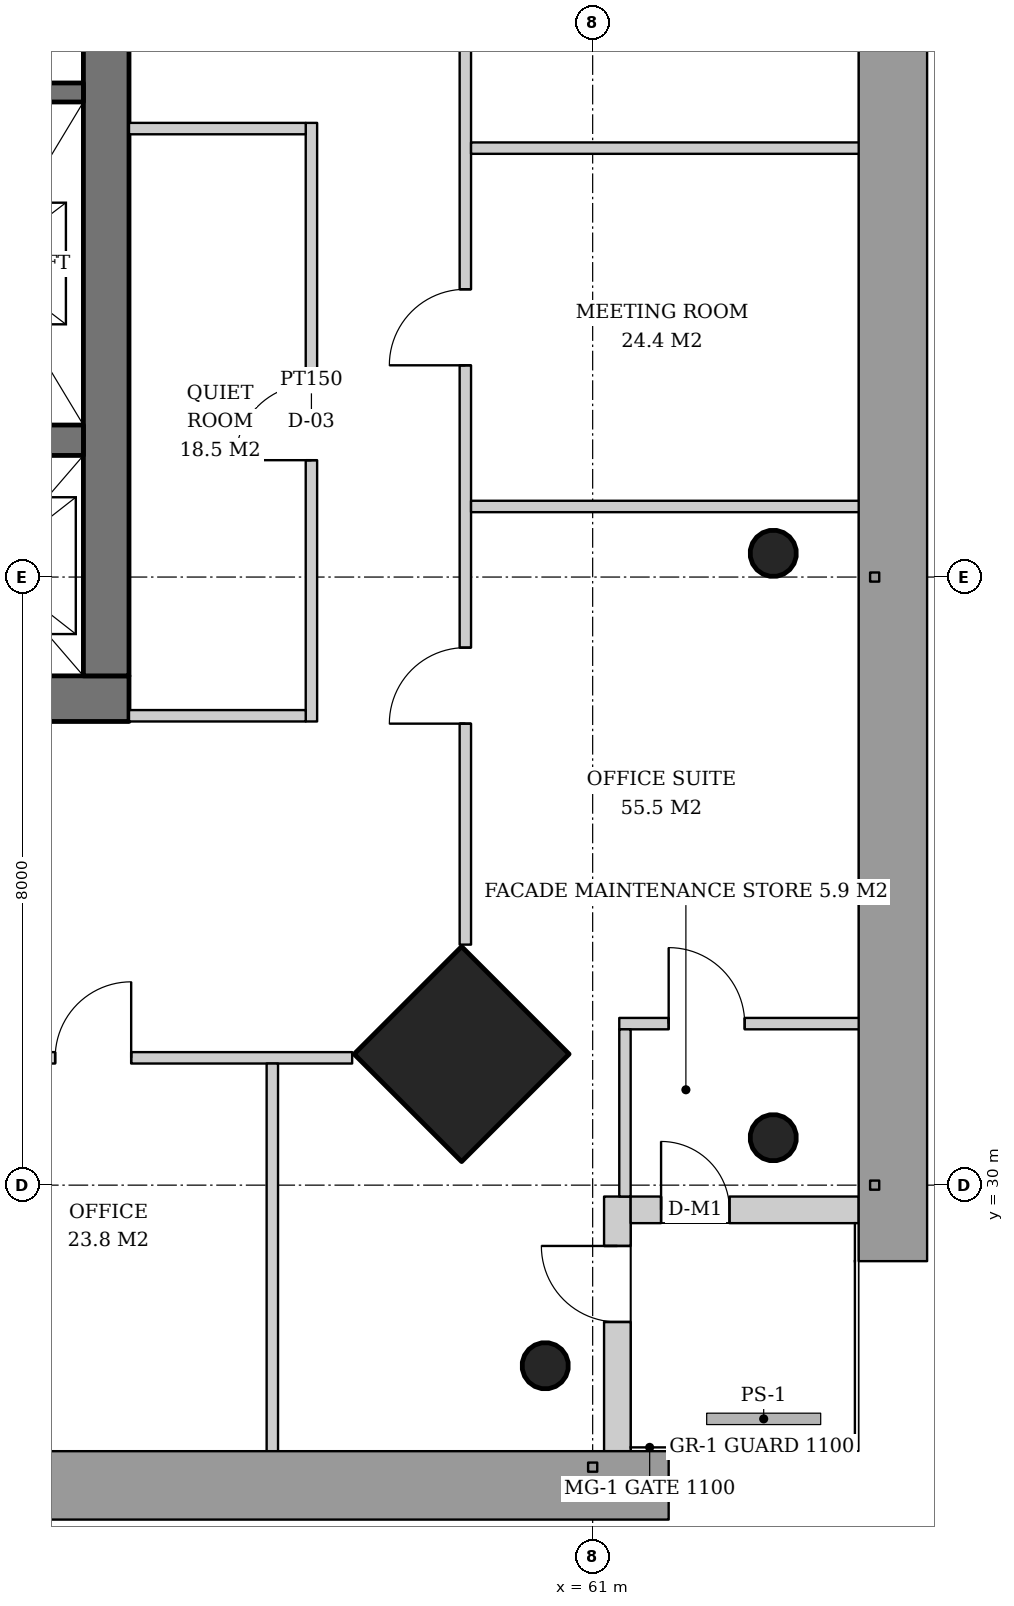
"""IFC4 building model, lengths in metres.
Left out: names, types, materials, properties, quantities, classifications, styles, units other than length and angle.
Written with IfcOpenShell. Run it as: python <this file> out.ifc"""

import sys

from ifc_helpers import new_model, si_unit, direction, frame, frame_2d, origin, origin_2d, place, context, subcontext, project, spatial, rectangle, hollow_circle, extrude, element, fill, save


model = new_model("IFC4")
c1 = context("Model", 3, precision=1e-05, world=origin(), true_north=direction((0.0, 1.0)))
c2 = subcontext(c1, "Body", "Model", "MODEL_VIEW")
j1 = project(units=[si_unit("LENGTHUNIT", "METRE"), si_unit("PLANEANGLEUNIT", "RADIAN")], contexts=[c1])
p1 = place(None, origin())
s1 = spatial("IfcSite", under=j1, at=p1, CompositionType="ELEMENT")
p2 = place(p1, origin())
s2 = spatial("IfcBuilding", under=s1, at=p2, CompositionType="ELEMENT")
p3 = place(p2, frame((0.0, 0.0, 195.8)))
s3 = spatial("IfcBuildingStorey", under=s2, at=p3, CompositionType="ELEMENT", Elevation=195.8)
p4 = place(p3, frame((63.414, 30.586, 0.0), z_axis=(-0.031898107953, 0.031898107953, 0.998981992539), x_axis=(-0.707106781187, -0.707106781187, 0.0)))
e1 = element("IfcColumn", 1, at=p4, inside=s3, PredefinedType="COLUMN", context=c2, shape_type="SweptSolid", body=[
    extrude(hollow_circle(Radius=0.305, WallThickness=0.025, at=origin_2d()), origin(), (0.0, 0.0, 1.0), 3.804),
])
p5 = place(p3, frame((63.414, 38.293, 0.0), z_axis=(-0.031910302246, 0.015923048203, 0.999363892257), x_axis=(-0.446493300058, -0.894786976326, 0.0)))
e2 = element("IfcColumn", 2, at=p5, inside=s3, PredefinedType="COLUMN", context=c2, shape_type="SweptSolid", body=[
    extrude(hollow_circle(Radius=0.305, WallThickness=0.025, at=origin_2d()), origin(), (0.0, 0.0, 1.0), 3.802),
])
p6 = place(p3, frame((59.314, 31.686, 0.0), z_axis=(-0.031898107953, 0.031898107953, 0.998981992539), x_axis=(-0.707106781187, -0.707106781187, 0.0)))
e3 = element("IfcColumn", 3, at=p6, inside=s3, PredefinedType="COLUMN", context=c2, shape_type="SweptSolid", body=[
    extrude(rectangle(XDim=2.0, YDim=2.0, at=origin_2d()), origin(), (0.0, 0.0, 1.0), 3.804),
])
p7 = place(p3, frame((60.414, 27.586, 0.0), z_axis=(-0.031898107953, 0.031898107953, 0.998981992539), x_axis=(-0.707106781187, -0.707106781187, 0.0)))
e4 = element("IfcColumn", 4, at=p7, inside=s3, PredefinedType="COLUMN", context=c2, shape_type="SweptSolid", body=[
    extrude(hollow_circle(Radius=0.305, WallThickness=0.025, at=origin_2d()), origin(), (0.0, 0.0, 1.0), 3.804),
])
p8 = place(p3, frame((35.1, 36.4, 0.0), z_axis=(0.0, 0.0, 1.0), x_axis=(1.0, 0.0, 0.0)))
e5 = element("IfcWall", 5, at=p8, inside=s3, PredefinedType="SHEAR", context=c2, shape_type="SweptSolid", body=[
    extrude(rectangle(XDim=19.8, YDim=0.6, at=frame_2d((9.9, 0.0))), origin(), (0.0, 0.0, 1.0), 3.8),
])
p9 = place(p8, frame((3.9, 0.0, 0.0)))
e6 = element("IfcOpeningElement", 6, at=p9, cuts=e5, PredefinedType="OPENING", context=c2, shape_type="SweptSolid", body=[
    extrude(rectangle(XDim=1.0, YDim=2.1, at=frame_2d((0.5, 1.05))), frame((0.0, 0.31, 0.0), z_axis=(0.0, -1.0, 0.0), x_axis=(1.0, 0.0, 0.0)), (0.0, 0.0, 1.0), 0.62),
])
p10 = place(p8, frame((15.35, 0.0, 0.0)))
e7 = element("IfcOpeningElement", 7, at=p10, cuts=e5, PredefinedType="OPENING", context=c2, shape_type="SweptSolid", body=[
    extrude(rectangle(XDim=1.0, YDim=2.1, at=frame_2d((0.5, 1.05))), frame((0.0, 0.31, 0.0), z_axis=(0.0, -1.0, 0.0), x_axis=(1.0, 0.0, 0.0)), (0.0, 0.0, 1.0), 0.62),
])
p11 = place(p3, frame((54.6, 36.7, 0.0), z_axis=(0.0, 0.0, 1.0), x_axis=(0.0, 1.0, 0.0)))
e8 = element("IfcWall", 8, at=p11, inside=s3, PredefinedType="SHEAR", context=c2, shape_type="SweptSolid", body=[
    extrude(rectangle(XDim=18.6, YDim=0.6, at=frame_2d((9.3, 0.0))), origin(), (0.0, 0.0, 1.0), 3.8),
])
p12 = place(p11, frame((8.4, 0.0, 0.0)))
e9 = element("IfcOpeningElement", 9, at=p12, cuts=e8, PredefinedType="OPENING", context=c2, shape_type="SweptSolid", body=[
    extrude(rectangle(XDim=1.8, YDim=2.4, at=frame_2d((0.9, 1.2))), frame((0.0, 0.31, 0.0), z_axis=(0.0, -1.0, 0.0), x_axis=(1.0, 0.0, 0.0)), (0.0, 0.0, 1.0), 0.62),
])
p13 = place(p3, frame((35.7, 39.8, 0.0), z_axis=(0.0, 0.0, 1.0), x_axis=(1.0, 0.0, 0.0)))
e10 = element("IfcWall", 10, at=p13, inside=s3, PredefinedType="SHEAR", context=c2, shape_type="SweptSolid", body=[
    extrude(rectangle(XDim=18.6, YDim=0.4, at=frame_2d((9.3, 0.0))), origin(), (0.0, 0.0, 1.0), 3.8),
])
p14 = place(p3, frame((61.325, 26.5, 0.0), z_axis=(0.0, 0.0, 1.0), x_axis=(0.0, 1.0, 0.0)))
e11 = element("IfcWall", 11, at=p14, inside=s3, PredefinedType="SOLIDWALL", context=c2, shape_type="SweptSolid", body=[
    extrude(rectangle(XDim=3.35, YDim=0.35, at=frame_2d((1.675, 0.0))), origin(), (0.0, 0.0, 1.0), 3.62),
])
p15 = place(p14, frame((1.7, 0.0, 0.0)))
e12 = element("IfcOpeningElement", 12, at=p15, cuts=e11, PredefinedType="OPENING", context=c2, shape_type="SweptSolid", body=[
    extrude(rectangle(XDim=1.0, YDim=2.4, at=frame_2d((0.5, 1.2))), frame((0.0, 0.185, 0.0), z_axis=(0.0, -1.0, 0.0), x_axis=(1.0, 0.0, 0.0)), (0.0, 0.0, 1.0), 0.37),
])
p16 = place(p3, frame((61.5, 29.675, 0.0), z_axis=(0.0, 0.0, 1.0), x_axis=(1.0, 0.0, 0.0)))
e13 = element("IfcWall", 13, at=p16, inside=s3, PredefinedType="SOLIDWALL", context=c2, shape_type="SweptSolid", body=[
    extrude(rectangle(XDim=3.0, YDim=0.35, at=frame_2d((1.5, 0.0))), origin(), (0.0, 0.0, 1.0), 3.62),
])
p17 = place(p16, frame((0.4, 0.0, 0.0)))
e14 = element("IfcOpeningElement", 14, at=p17, cuts=e13, PredefinedType="OPENING", context=c2, shape_type="SweptSolid", body=[
    extrude(rectangle(XDim=0.9, YDim=2.1, at=frame_2d((0.45, 1.05))), frame((0.0, 0.185, 0.0), z_axis=(0.0, -1.0, 0.0), x_axis=(1.0, 0.0, 0.0)), (0.0, 0.0, 1.0), 0.37),
])
p18 = place(p3, frame((48.93, 44.375, 0.0), z_axis=(0.0, 0.0, 1.0), x_axis=(1.0, 0.0, 0.0)))
e15 = element("IfcWall", 15, at=p18, inside=s3, PredefinedType="SHEAR", context=c2, shape_type="SweptSolid", body=[
    extrude(rectangle(XDim=5.37, YDim=0.25, at=frame_2d((2.685, 0.0))), origin(), (0.0, 0.0, 1.0), 3.8),
])
p19 = place(p3, frame((57.3, 36.1, 0.0), z_axis=(0.0, 0.0, 1.0), x_axis=(0.0, 1.0, 0.0)))
e16 = element("IfcWall", 16, at=p19, inside=s3, PredefinedType="PARTITIONING", context=c2, shape_type="SweptSolid", body=[
    extrude(rectangle(XDim=7.875, YDim=0.15, at=frame_2d((3.938, 0.0))), origin(), (0.0, 0.0, 1.0), 2.867),
])
p20 = place(p19, frame((3.438, 0.0, 0.0)))
e17 = element("IfcOpeningElement", 17, at=p20, cuts=e16, PredefinedType="OPENING", context=c2, shape_type="SweptSolid", body=[
    extrude(rectangle(XDim=1.0, YDim=2.1, at=frame_2d((0.5, 1.05))), frame((0.0, 0.085, 0.0), z_axis=(0.0, -1.0, 0.0), x_axis=(1.0, 0.0, 0.0)), (0.0, 0.0, 1.0), 0.17),
])
p21 = place(p3, frame((54.9, 36.175, 0.0), z_axis=(0.0, 0.0, 1.0), x_axis=(1.0, 0.0, 0.0)))
e18 = element("IfcWall", 18, at=p21, inside=s3, PredefinedType="PARTITIONING", context=c2, shape_type="SweptSolid", body=[
    extrude(rectangle(XDim=2.325, YDim=0.15, at=frame_2d((1.163, 0.0))), origin(), (0.0, 0.0, 1.0), 2.867),
])
p22 = place(p3, frame((54.9, 43.9, 0.0), z_axis=(0.0, 0.0, 1.0), x_axis=(1.0, 0.0, 0.0)))
e19 = element("IfcWall", 19, at=p22, inside=s3, PredefinedType="PARTITIONING", context=c2, shape_type="SweptSolid", body=[
    extrude(rectangle(XDim=2.325, YDim=0.15, at=frame_2d((1.163, 0.0))), origin(), (0.0, 0.0, 1.0), 3.62),
])
p23 = place(p3, frame((59.325, 33.164, 0.0), z_axis=(0.0, 0.0, 1.0), x_axis=(0.0, 1.0, 0.0)))
e20 = element("IfcWall", 20, at=p23, inside=s3, PredefinedType="PARTITIONING", context=c2, shape_type="SweptSolid", body=[
    extrude(rectangle(XDim=25.671, YDim=0.15, at=frame_2d((12.836, 0.0))), origin(), (0.0, 0.0, 1.0), 2.867),
])
p24 = place(p23, frame((2.907, 0.0, 0.0)))
e21 = element("IfcOpeningElement", 21, at=p24, cuts=e20, PredefinedType="OPENING", context=c2, shape_type="SweptSolid", body=[
    extrude(rectangle(XDim=1.0, YDim=2.1, at=frame_2d((0.5, 1.05))), frame((0.0, 0.085, 0.0), z_axis=(0.0, -1.0, 0.0), x_axis=(1.0, 0.0, 0.0)), (0.0, 0.0, 1.0), 0.17),
])
p25 = place(p23, frame((7.622, 0.0, 0.0)))
e22 = element("IfcOpeningElement", 22, at=p25, cuts=e20, PredefinedType="OPENING", context=c2, shape_type="SweptSolid", body=[
    extrude(rectangle(XDim=1.0, YDim=2.1, at=frame_2d((0.5, 1.05))), frame((0.0, 0.085, 0.0), z_axis=(0.0, -1.0, 0.0), x_axis=(1.0, 0.0, 0.0)), (0.0, 0.0, 1.0), 0.17),
])
p26 = place(p23, frame((12.336, 0.0, 0.0)))
e23 = element("IfcOpeningElement", 23, at=p26, cuts=e20, PredefinedType="OPENING", context=c2, shape_type="SweptSolid", body=[
    extrude(rectangle(XDim=1.0, YDim=2.1, at=frame_2d((0.5, 1.05))), frame((0.0, 0.085, 0.0), z_axis=(0.0, -1.0, 0.0), x_axis=(1.0, 0.0, 0.0)), (0.0, 0.0, 1.0), 0.17),
])
p27 = place(p23, frame((17.05, 0.0, 0.0)))
e24 = element("IfcOpeningElement", 24, at=p27, cuts=e20, PredefinedType="OPENING", context=c2, shape_type="SweptSolid", body=[
    extrude(rectangle(XDim=1.0, YDim=2.1, at=frame_2d((0.5, 1.05))), frame((0.0, 0.085, 0.0), z_axis=(0.0, -1.0, 0.0), x_axis=(1.0, 0.0, 0.0)), (0.0, 0.0, 1.0), 0.17),
])
for number, where, z_axis, x_axis in (
    (25, (59.4, 38.928, 0.0), (0.0, 0.0, 1.0), (1.0, 0.0, 0.0)),
    (26, (59.4, 43.643, 0.0), (0.0, 0.0, 1.0), (1.0, 0.0, 0.0)),
):
    element("IfcWall", number, at=place(p3, frame(where, z_axis=z_axis, x_axis=x_axis)), inside=s3, PredefinedType="PARTITIONING", context=c2, shape_type="SweptSolid", body=[
        extrude(rectangle(XDim=5.14, YDim=0.15, at=frame_2d((2.57, 0.0))), origin(), (0.0, 0.0, 1.0), 3.12),
    ])
p28 = place(p3, frame((32.164, 31.675, 0.0), z_axis=(0.0, 0.0, 1.0), x_axis=(1.0, 0.0, 0.0)))
e27 = element("IfcWall", 27, at=p28, inside=s3, PredefinedType="PARTITIONING", context=c2, shape_type="SweptSolid", body=[
    extrude(rectangle(XDim=25.671, YDim=0.15, at=frame_2d((12.836, 0.0))), origin(), (0.0, 0.0, 1.0), 2.867),
])
p29 = place(p28, frame((2.907, 0.0, 0.0)))
e28 = element("IfcOpeningElement", 28, at=p29, cuts=e27, PredefinedType="OPENING", context=c2, shape_type="SweptSolid", body=[
    extrude(rectangle(XDim=1.0, YDim=2.1, at=frame_2d((0.5, 1.05))), frame((0.0, 0.085, 0.0), z_axis=(0.0, -1.0, 0.0), x_axis=(1.0, 0.0, 0.0)), (0.0, 0.0, 1.0), 0.17),
])
p30 = place(p28, frame((7.622, 0.0, 0.0)))
e29 = element("IfcOpeningElement", 29, at=p30, cuts=e27, PredefinedType="OPENING", context=c2, shape_type="SweptSolid", body=[
    extrude(rectangle(XDim=1.0, YDim=2.1, at=frame_2d((0.5, 1.05))), frame((0.0, 0.085, 0.0), z_axis=(0.0, -1.0, 0.0), x_axis=(1.0, 0.0, 0.0)), (0.0, 0.0, 1.0), 0.17),
])
p31 = place(p28, frame((12.336, 0.0, 0.0)))
e30 = element("IfcOpeningElement", 30, at=p31, cuts=e27, PredefinedType="OPENING", context=c2, shape_type="SweptSolid", body=[
    extrude(rectangle(XDim=1.0, YDim=2.1, at=frame_2d((0.5, 1.05))), frame((0.0, 0.085, 0.0), z_axis=(0.0, -1.0, 0.0), x_axis=(1.0, 0.0, 0.0)), (0.0, 0.0, 1.0), 0.17),
])
p32 = place(p28, frame((17.05, 0.0, 0.0)))
e31 = element("IfcOpeningElement", 31, at=p32, cuts=e27, PredefinedType="OPENING", context=c2, shape_type="SweptSolid", body=[
    extrude(rectangle(XDim=1.0, YDim=2.1, at=frame_2d((0.5, 1.05))), frame((0.0, 0.085, 0.0), z_axis=(0.0, -1.0, 0.0), x_axis=(1.0, 0.0, 0.0)), (0.0, 0.0, 1.0), 0.17),
])
p33 = place(p28, frame((21.764, 0.0, 0.0)))
e32 = element("IfcOpeningElement", 32, at=p33, cuts=e27, PredefinedType="OPENING", context=c2, shape_type="SweptSolid", body=[
    extrude(rectangle(XDim=1.0, YDim=2.1, at=frame_2d((0.5, 1.05))), frame((0.0, 0.085, 0.0), z_axis=(0.0, -1.0, 0.0), x_axis=(1.0, 0.0, 0.0)), (0.0, 0.0, 1.0), 0.17),
])
p34 = place(p3, frame((56.786, 31.6, 0.0), z_axis=(0.0, 0.0, 1.0), x_axis=(0.0, -1.0, 0.0)))
e33 = element("IfcWall", 33, at=p34, inside=s3, PredefinedType="PARTITIONING", context=c2, shape_type="SweptSolid", body=[
    extrude(rectangle(XDim=5.14, YDim=0.15, at=frame_2d((2.57, 0.0))), origin(), (0.0, 0.0, 1.0), 3.12),
])
p35 = place(p3, frame((61.35, 32.125, 0.0), z_axis=(0.0, 0.0, 1.0), x_axis=(1.0, 0.0, 0.0)))
e34 = element("IfcWall", 34, at=p35, inside=s3, PredefinedType="PARTITIONING", context=c2, shape_type="SweptSolid", body=[
    extrude(rectangle(XDim=3.19, YDim=0.15, at=frame_2d((1.595, 0.0))), origin(), (0.0, 0.0, 1.0), 3.12),
])
p36 = place(p35, frame((0.65, 0.0, 0.0)))
e35 = element("IfcOpeningElement", 35, at=p36, cuts=e34, PredefinedType="OPENING", context=c2, shape_type="SweptSolid", body=[
    extrude(rectangle(XDim=1.0, YDim=2.1, at=frame_2d((0.5, 1.05))), frame((0.0, 0.085, 0.0), z_axis=(0.0, -1.0, 0.0), x_axis=(1.0, 0.0, 0.0)), (0.0, 0.0, 1.0), 0.17),
])
p37 = place(p3, frame((61.425, 32.05, 0.0), z_axis=(0.0, 0.0, 1.0), x_axis=(0.0, -1.0, 0.0)))
e36 = element("IfcWall", 36, at=p37, inside=s3, PredefinedType="PARTITIONING", context=c2, shape_type="SweptSolid", body=[
    extrude(rectangle(XDim=2.2, YDim=0.15, at=frame_2d((1.1, 0.0))), origin(), (0.0, 0.0, 1.0), 3.02),
])
p38 = place(p17, origin())
e37 = element("IfcDoor", 37, at=p38, inside=s3, OperationType="SINGLE_SWING_LEFT", PredefinedType="DOOR", context=c2, shape_type="SweptSolid", body=[
    extrude(rectangle(XDim=0.9, YDim=2.1, at=frame_2d((0.45, 1.05))), frame((0.0, 0.025, 0.0), z_axis=(0.0, -1.0, 0.0), x_axis=(1.0, 0.0, 0.0)), (0.0, 0.0, 1.0), 0.05),
])
fill(e14, e37)
p39 = place(p15, origin())
e38 = element("IfcDoor", 38, at=p39, inside=s3, OperationType="SINGLE_SWING_RIGHT", PredefinedType="DOOR", context=c2, shape_type="SweptSolid", body=[
    extrude(rectangle(XDim=1.0, YDim=2.4, at=frame_2d((0.5, 1.2))), frame((0.0, 0.025, 0.0), z_axis=(0.0, -1.0, 0.0), x_axis=(1.0, 0.0, 0.0)), (0.0, 0.0, 1.0), 0.05),
])
fill(e12, e38)
p40 = place(p20, origin())
e39 = element("IfcDoor", 39, at=p40, inside=s3, OperationType="SINGLE_SWING_LEFT", PredefinedType="DOOR", context=c2, shape_type="SweptSolid", body=[
    extrude(rectangle(XDim=1.0, YDim=2.1, at=frame_2d((0.5, 1.05))), frame((0.0, 0.025, 0.0), z_axis=(0.0, -1.0, 0.0), x_axis=(1.0, 0.0, 0.0)), (0.0, 0.0, 1.0), 0.05),
])
fill(e17, e39)
p41 = place(p24, origin())
e40 = element("IfcDoor", 40, at=p41, inside=s3, OperationType="SINGLE_SWING_LEFT", PredefinedType="DOOR", context=c2, shape_type="SweptSolid", body=[
    extrude(rectangle(XDim=1.0, YDim=2.1, at=frame_2d((0.5, 1.05))), frame((0.0, 0.025, 0.0), z_axis=(0.0, -1.0, 0.0), x_axis=(1.0, 0.0, 0.0)), (0.0, 0.0, 1.0), 0.05),
])
fill(e21, e40)
p42 = place(p25, origin())
e41 = element("IfcDoor", 41, at=p42, inside=s3, OperationType="SINGLE_SWING_LEFT", PredefinedType="DOOR", context=c2, shape_type="SweptSolid", body=[
    extrude(rectangle(XDim=1.0, YDim=2.1, at=frame_2d((0.5, 1.05))), frame((0.0, 0.025, 0.0), z_axis=(0.0, -1.0, 0.0), x_axis=(1.0, 0.0, 0.0)), (0.0, 0.0, 1.0), 0.05),
])
fill(e22, e41)
p43 = place(p33, origin())
e42 = element("IfcDoor", 42, at=p43, inside=s3, OperationType="SINGLE_SWING_RIGHT", PredefinedType="DOOR", context=c2, shape_type="SweptSolid", body=[
    extrude(rectangle(XDim=1.0, YDim=2.1, at=frame_2d((0.5, 1.05))), frame((0.0, 0.025, 0.0), z_axis=(0.0, -1.0, 0.0), x_axis=(1.0, 0.0, 0.0)), (0.0, 0.0, 1.0), 0.05),
])
fill(e32, e42)
p44 = place(p36, origin())
e43 = element("IfcDoor", 43, at=p44, inside=s3, OperationType="SINGLE_SWING_LEFT", PredefinedType="DOOR", context=c2, shape_type="SweptSolid", body=[
    extrude(rectangle(XDim=1.0, YDim=2.1, at=frame_2d((0.5, 1.05))), frame((0.0, 0.025, 0.0), z_axis=(0.0, -1.0, 0.0), x_axis=(1.0, 0.0, 0.0)), (0.0, 0.0, 1.0), 0.05),
])
fill(e35, e43)
save(model, sys.argv[1])
